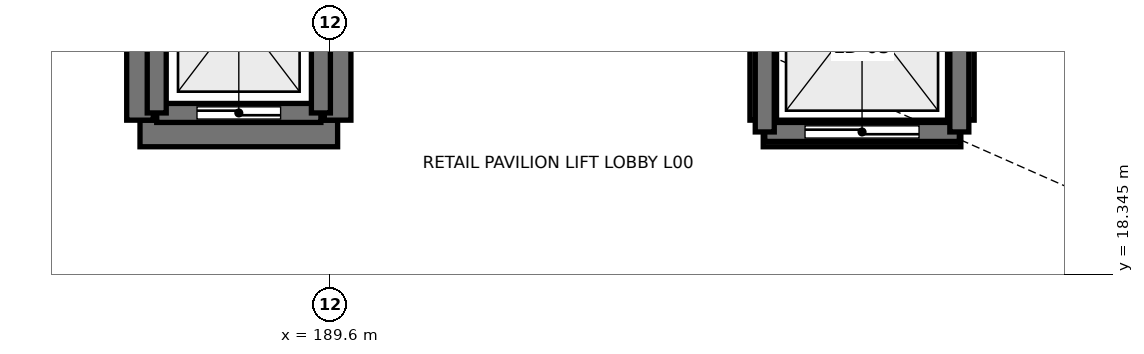
"""IFC4 building model, lengths in metres.
Left out: names, types, materials, properties, quantities, classifications, styles, units other than length and angle.
Written with IfcOpenShell. Run it as: python <this file> out.ifc"""

import sys

from ifc_helpers import new_model, si_unit, direction, frame, frame_2d, origin, place, context, subcontext, project, spatial, rectangle, extrude, element, fill, save


model = new_model("IFC4")
c1 = context("Model", 3, precision=1e-05, world=origin(), true_north=direction((0.0, 1.0)))
c2 = subcontext(c1, "Body", "Model", "MODEL_VIEW")
j1 = project(units=[si_unit("LENGTHUNIT", "METRE"), si_unit("PLANEANGLEUNIT", "RADIAN")], contexts=[c1])
p1 = place(None, origin())
s1 = spatial("IfcSite", under=j1, at=p1, CompositionType="ELEMENT")
p2 = place(p1, origin())
s2 = spatial("IfcBuilding", under=s1, at=p2, CompositionType="ELEMENT")
p3 = place(p2, origin())
s3 = spatial("IfcBuildingStorey", under=s2, at=p3, CompositionType="ELEMENT", Elevation=0.0)
p4 = place(p3, frame((187.1, 20.2, -1.35), z_axis=(0.0, 0.0, 1.0), x_axis=(1.0, 0.0, 0.0)))
e1 = element("IfcWall", 1, at=p4, inside=s3, PredefinedType="SOLIDWALL", context=c2, shape_type="SweptSolid", body=[
    extrude(rectangle(XDim=2.6, YDim=0.35, at=frame_2d((1.3, 0.0))), origin(), (0.0, 0.0, 1.0), 1.35),
])
for number, where, z_axis, x_axis in (
    (2, (189.7, 20.375, -1.35), (0.0, 0.0, 1.0), (0.0, 1.0, 0.0)),
    (3, (187.1, 23.225, -1.35), (0.0, 0.0, 1.0), (0.0, -1.0, 0.0)),
):
    element("IfcWall", number, at=place(p3, frame(where, z_axis=z_axis, x_axis=x_axis)), inside=s3, PredefinedType="SOLIDWALL", context=c2, shape_type="SweptSolid", body=[
        extrude(rectangle(XDim=2.85, YDim=0.35, at=frame_2d((1.425, 0.0))), origin(), (0.0, 0.0, 1.0), 1.35),
    ])
p5 = place(p3, frame((195.3, 20.2, -1.35), z_axis=(0.0, 0.0, 1.0), x_axis=(1.0, 0.0, 0.0)))
e4 = element("IfcWall", 4, at=p5, inside=s3, PredefinedType="SOLIDWALL", context=c2, shape_type="SweptSolid", body=[
    extrude(rectangle(XDim=2.6, YDim=0.35, at=frame_2d((1.3, 0.0))), origin(), (0.0, 0.0, 1.0), 1.35),
])
for number, where, z_axis, x_axis in (
    (5, (197.9, 20.375, -1.35), (0.0, 0.0, 1.0), (0.0, 1.0, 0.0)),
    (6, (195.3, 23.225, -1.35), (0.0, 0.0, 1.0), (0.0, -1.0, 0.0)),
):
    element("IfcWall", number, at=place(p3, frame(where, z_axis=z_axis, x_axis=x_axis)), inside=s3, PredefinedType="SOLIDWALL", context=c2, shape_type="SweptSolid", body=[
        extrude(rectangle(XDim=2.85, YDim=0.35, at=frame_2d((1.425, 0.0))), origin(), (0.0, 0.0, 1.0), 1.35),
    ])
p6 = place(p3, frame((187.32, 20.47, 0.0), z_axis=(0.0, 0.0, 1.0), x_axis=(1.0, 0.0, 0.0)))
e7 = element("IfcWall", 7, at=p6, inside=s3, PredefinedType="SHEAR", context=c2, shape_type="SweptSolid", body=[
    extrude(rectangle(XDim=2.16, YDim=0.25, at=frame_2d((1.08, 0.0))), origin(), (0.0, 0.0, 1.0), 5.18),
])
p7 = place(p6, frame((0.53, 0.0, 0.0)))
e8 = element("IfcOpeningElement", 8, at=p7, cuts=e7, PredefinedType="OPENING", context=c2, shape_type="SweptSolid", body=[
    extrude(rectangle(XDim=1.1, YDim=2.2, at=frame_2d((0.55, 1.1))), frame((0.0, 0.135, 0.0), z_axis=(0.0, -1.0, 0.0), x_axis=(1.0, 0.0, 0.0)), (0.0, 0.0, 1.0), 0.27),
])
for number, where, z_axis, x_axis in (
    (9, (189.48, 20.47, 0.0), (0.0, 0.0, 1.0), (0.0, 1.0, 0.0)),
    (10, (187.32, 23.13, 0.0), (0.0, 0.0, 1.0), (0.0, -1.0, 0.0)),
):
    element("IfcWall", number, at=place(p3, frame(where, z_axis=z_axis, x_axis=x_axis)), inside=s3, PredefinedType="SHEAR", context=c2, shape_type="SweptSolid", body=[
        extrude(rectangle(XDim=2.66, YDim=0.25, at=frame_2d((1.33, 0.0))), origin(), (0.0, 0.0, 1.0), 5.18),
    ])
p8 = place(p3, frame((195.32, 20.22, 0.0), z_axis=(0.0, 0.0, 1.0), x_axis=(1.0, 0.0, 0.0)))
e11 = element("IfcWall", 11, at=p8, inside=s3, PredefinedType="SHEAR", context=c2, shape_type="SweptSolid", body=[
    extrude(rectangle(XDim=2.56, YDim=0.25, at=frame_2d((1.28, 0.0))), origin(), (0.0, 0.0, 1.0), 5.18),
])
p9 = place(p8, frame((0.53, 0.0, 0.0)))
e12 = element("IfcOpeningElement", 12, at=p9, cuts=e11, PredefinedType="OPENING", context=c2, shape_type="SweptSolid", body=[
    extrude(rectangle(XDim=1.5, YDim=2.3, at=frame_2d((0.75, 1.15))), frame((0.0, 0.135, 0.0), z_axis=(0.0, -1.0, 0.0), x_axis=(1.0, 0.0, 0.0)), (0.0, 0.0, 1.0), 0.27),
])
for number, where, z_axis, x_axis in (
    (13, (197.88, 20.22, 0.0), (0.0, 0.0, 1.0), (0.0, 1.0, 0.0)),
    (14, (195.32, 23.38, 0.0), (0.0, 0.0, 1.0), (0.0, -1.0, 0.0)),
):
    element("IfcWall", number, at=place(p3, frame(where, z_axis=z_axis, x_axis=x_axis)), inside=s3, PredefinedType="SHEAR", context=c2, shape_type="SweptSolid", body=[
        extrude(rectangle(XDim=3.16, YDim=0.25, at=frame_2d((1.58, 0.0))), origin(), (0.0, 0.0, 1.0), 5.18),
    ])
p10 = place(p7, origin())
e15 = element("IfcDoor", 15, at=p10, inside=s3, OperationType="SLIDING_TO_LEFT", PredefinedType="DOOR", context=c2, shape_type="SweptSolid", body=[
    extrude(rectangle(XDim=1.1, YDim=2.2, at=frame_2d((0.55, 1.1))), frame((0.0, 0.025, 0.0), z_axis=(0.0, -1.0, 0.0), x_axis=(1.0, 0.0, 0.0)), (0.0, 0.0, 1.0), 0.05),
])
fill(e8, e15)
p11 = place(p9, origin())
e16 = element("IfcDoor", 16, at=p11, inside=s3, OperationType="SLIDING_TO_LEFT", PredefinedType="DOOR", context=c2, shape_type="SweptSolid", body=[
    extrude(rectangle(XDim=1.5, YDim=2.3, at=frame_2d((0.75, 1.15))), frame((0.0, 0.025, 0.0), z_axis=(0.0, -1.0, 0.0), x_axis=(1.0, 0.0, 0.0)), (0.0, 0.0, 1.0), 0.05),
])
fill(e12, e16)
save(model, sys.argv[1])
